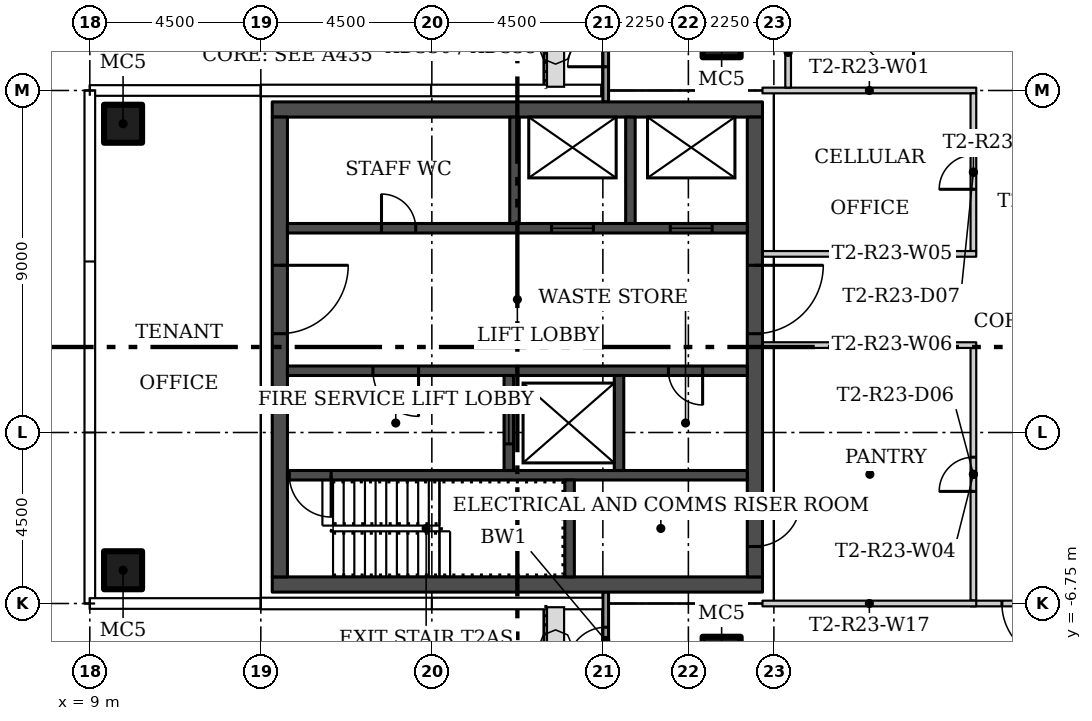
"""IFC4 building model, lengths in metres.
Left out: names, types, materials, properties, quantities, classifications, styles, units other than length and angle.
Written with IfcOpenShell. Run it as: python <this file> out.ifc"""

import sys

from ifc_helpers import new_model, si_unit, direction, frame, frame_2d, origin, origin_2d, place, context, subcontext, project, spatial, rectangle, hollow_rectangle, extrude, element, fill, save


model = new_model("IFC4")
c1 = context("Model", 3, precision=1e-05, world=origin(), true_north=direction((0.0, 1.0)))
c2 = subcontext(c1, "Body", "Model", "MODEL_VIEW")
j1 = project(units=[si_unit("LENGTHUNIT", "METRE"), si_unit("PLANEANGLEUNIT", "RADIAN")], contexts=[c1])
p1 = place(None, origin())
s1 = spatial("IfcSite", under=j1, at=p1, CompositionType="ELEMENT")
p2 = place(p1, origin())
s2 = spatial("IfcBuilding", under=s1, at=p2, CompositionType="ELEMENT")
p3 = place(p2, frame((0.0, 0.0, 210.0)))
s3 = spatial("IfcBuildingStorey", under=s2, at=p3, CompositionType="ELEMENT", Elevation=210.0)
for number, where in (
    (1, (25.625, 8.125, 0.0)),
    (2, (25.625, -8.125, 0.0)),
    (3, (9.875, -5.875, 0.0)),
    (4, (9.875, 5.875, 0.0)),
):
    element("IfcColumn", number, at=place(p3, frame(where)), inside=s3, PredefinedType="COLUMN", context=c2, shape_type="SweptSolid", body=[
        extrude(hollow_rectangle(XDim=1.0, YDim=1.0, WallThickness=0.04, at=origin_2d()), origin(), (0.0, 0.0, 1.0), 3.55),
    ])
p4 = place(p3, frame((32.325, 6.75, 0.0), z_axis=(0.0, 0.0, 1.0), x_axis=(-1.0, 0.0, 0.0)))
e5 = element("IfcWall", 5, at=p4, inside=s3, PredefinedType="PARTITIONING", context=c2, shape_type="SweptSolid", body=[
    extrude(rectangle(XDim=5.625, YDim=0.15, at=frame_2d((2.812, 0.0))), origin(), (0.0, 0.0, 1.0), 3.55),
])
p5 = place(p3, frame((32.25, 2.525, 0.0), z_axis=(0.0, 0.0, 1.0), x_axis=(0.0, 1.0, 0.0)))
e6 = element("IfcWall", 6, at=p5, inside=s3, PredefinedType="PARTITIONING", context=c2, shape_type="SweptSolid", body=[
    extrude(rectangle(XDim=4.15, YDim=0.15, at=frame_2d((2.075, 0.0))), origin(), (0.0, 0.0, 1.0), 3.55),
])
p6 = place(p5, frame((1.625, 0.0, 0.0)))
e7 = element("IfcOpeningElement", 7, at=p6, cuts=e6, PredefinedType="OPENING", context=c2, shape_type="SweptSolid", body=[
    extrude(rectangle(XDim=0.9, YDim=2.1, at=frame_2d((0.45, 1.05))), frame((0.0, 0.085, 0.0), z_axis=(0.0, -1.0, 0.0), x_axis=(1.0, 0.0, 0.0)), (0.0, 0.0, 1.0), 0.17),
])
p7 = place(p3, frame((32.25, -6.675, 0.0), z_axis=(0.0, 0.0, 1.0), x_axis=(0.0, 1.0, 0.0)))
e8 = element("IfcWall", 8, at=p7, inside=s3, PredefinedType="PARTITIONING", context=c2, shape_type="SweptSolid", body=[
    extrude(rectangle(XDim=6.65, YDim=0.15, at=frame_2d((3.325, 0.0))), origin(), (0.0, 0.0, 1.0), 3.55),
])
p8 = place(p7, frame((2.875, 0.0, 0.0)))
e9 = element("IfcOpeningElement", 9, at=p8, cuts=e8, PredefinedType="OPENING", context=c2, shape_type="SweptSolid", body=[
    extrude(rectangle(XDim=0.9, YDim=2.1, at=frame_2d((0.45, 1.05))), frame((0.0, 0.085, 0.0), z_axis=(0.0, -1.0, 0.0), x_axis=(1.0, 0.0, 0.0)), (0.0, 0.0, 1.0), 0.17),
])
p9 = place(p3, frame((26.7, 2.45, 0.0)))
e10 = element("IfcWall", 10, at=p9, inside=s3, PredefinedType="PARTITIONING", context=c2, shape_type="SweptSolid", body=[
    extrude(rectangle(XDim=5.625, YDim=0.15, at=frame_2d((2.812, 0.0))), origin(), (0.0, 0.0, 1.0), 3.55),
])
p10 = place(p3, frame((32.325, 0.05, 0.0), z_axis=(0.0, 0.0, 1.0), x_axis=(-1.0, 0.0, 0.0)))
e11 = element("IfcWall", 11, at=p10, inside=s3, PredefinedType="PARTITIONING", context=c2, shape_type="SweptSolid", body=[
    extrude(rectangle(XDim=5.625, YDim=0.15, at=frame_2d((2.812, 0.0))), origin(), (0.0, 0.0, 1.0), 3.55),
])
p11 = place(p3, frame((27.375, 8.675, 0.0), z_axis=(0.0, 0.0, 1.0), x_axis=(0.0, -1.0, 0.0)))
e12 = element("IfcWall", 12, at=p11, inside=s3, PredefinedType="PARTITIONING", context=c2, shape_type="SweptSolid", body=[
    extrude(rectangle(XDim=1.85, YDim=0.15, at=frame_2d((0.925, 0.0))), origin(), (0.0, 0.0, 1.0), 3.55),
])
p12 = place(p3, frame((35.325, -6.75, 0.0), z_axis=(0.0, 0.0, 1.0), x_axis=(-1.0, 0.0, 0.0)))
e13 = element("IfcWall", 13, at=p12, inside=s3, PredefinedType="PARTITIONING", context=c2, shape_type="SweptSolid", body=[
    extrude(rectangle(XDim=3.15, YDim=0.15, at=frame_2d((1.575, 0.0))), origin(), (0.0, 0.0, 1.0), 3.55),
])
p13 = place(p12, frame((0.825, 0.0, 0.0)))
e14 = element("IfcOpeningElement", 14, at=p13, cuts=e13, PredefinedType="OPENING", context=c2, shape_type="SweptSolid", body=[
    extrude(rectangle(XDim=1.5, YDim=2.1, at=frame_2d((0.75, 1.05))), frame((0.0, 0.085, 0.0), z_axis=(0.0, -1.0, 0.0), x_axis=(1.0, 0.0, 0.0)), (0.0, 0.0, 1.0), 0.17),
])
p14 = place(p3, frame((26.7, -6.75, 0.0)))
e15 = element("IfcWall", 15, at=p14, inside=s3, PredefinedType="PARTITIONING", context=c2, shape_type="SweptSolid", body=[
    extrude(rectangle(XDim=5.625, YDim=0.15, at=frame_2d((2.812, 0.0))), origin(), (0.0, 0.0, 1.0), 3.55),
])
p15 = place(p3, frame((22.575, 6.448, 0.0), z_axis=(0.0, 0.0, 1.0), x_axis=(0.0, 1.0, 0.0)))
e16 = element("IfcWall", 16, at=p15, inside=s3, PredefinedType="SOLIDWALL", context=c2, shape_type="SweptSolid", body=[
    extrude(rectangle(XDim=2.552, YDim=0.15, at=frame_2d((1.276, 0.0))), origin(), (0.0, 0.0, 1.0), 3.45),
])
p16 = place(p15, frame((0.927, 0.0, 0.0)))
e17 = element("IfcOpeningElement", 17, at=p16, cuts=e16, PredefinedType="OPENING", context=c2, shape_type="SweptSolid", body=[
    extrude(rectangle(XDim=1.0, YDim=2.4, at=frame_2d((0.5, 1.2))), frame((0.0, 0.085, 0.0), z_axis=(0.0, -1.0, 0.0), x_axis=(1.0, 0.0, 0.0)), (0.0, 0.0, 1.0), 0.17),
])
p17 = place(p3, frame((22.575, -9.0, 0.0), z_axis=(0.0, 0.0, 1.0), x_axis=(0.0, 1.0, 0.0)))
e18 = element("IfcWall", 18, at=p17, inside=s3, PredefinedType="SOLIDWALL", context=c2, shape_type="SweptSolid", body=[
    extrude(rectangle(XDim=2.557, YDim=0.15, at=frame_2d((1.278, 0.0))), origin(), (0.0, 0.0, 1.0), 3.45),
])
p18 = place(p17, frame((0.625, 0.0, 0.0)))
e19 = element("IfcOpeningElement", 19, at=p18, cuts=e18, PredefinedType="OPENING", context=c2, shape_type="SweptSolid", body=[
    extrude(rectangle(XDim=1.0, YDim=2.4, at=frame_2d((0.5, 1.2))), frame((0.0, 0.085, 0.0), z_axis=(0.0, -1.0, 0.0), x_axis=(1.0, 0.0, 0.0)), (0.0, 0.0, 1.0), 0.17),
])
for number, where in (
    (20, (13.8, -6.25, 0.0)),
    (21, (13.8, 6.25, 0.0)),
):
    element("IfcWall", number, at=place(p3, frame(where)), inside=s3, PredefinedType="SHEAR", context=c2, shape_type="SweptSolid", body=[
        extrude(rectangle(XDim=12.9, YDim=0.4, at=frame_2d((6.45, 0.0))), origin(), (0.0, 0.0, 1.0), 3.55),
    ])
p19 = place(p3, frame((14.0, 6.05, 0.0), z_axis=(0.0, 0.0, 1.0), x_axis=(0.0, -1.0, 0.0)))
e22 = element("IfcWall", 22, at=p19, inside=s3, PredefinedType="SHEAR", context=c2, shape_type="SweptSolid", body=[
    extrude(rectangle(XDim=12.1, YDim=0.4, at=frame_2d((6.05, 0.0))), origin(), (0.0, 0.0, 1.0), 3.55),
])
p20 = place(p19, frame((3.9, 0.0, 0.0)))
e23 = element("IfcOpeningElement", 23, at=p20, cuts=e22, PredefinedType="OPENING", context=c2, shape_type="SweptSolid", body=[
    extrude(rectangle(XDim=1.8, YDim=2.4, at=frame_2d((0.9, 1.2))), frame((0.0, 0.21, 0.0), z_axis=(0.0, -1.0, 0.0), x_axis=(1.0, 0.0, 0.0)), (0.0, 0.0, 1.0), 0.42),
])
p21 = place(p3, frame((26.5, 6.05, 0.0), z_axis=(0.0, 0.0, 1.0), x_axis=(0.0, -1.0, 0.0)))
e24 = element("IfcWall", 24, at=p21, inside=s3, PredefinedType="SHEAR", context=c2, shape_type="SweptSolid", body=[
    extrude(rectangle(XDim=12.1, YDim=0.4, at=frame_2d((6.05, 0.0))), origin(), (0.0, 0.0, 1.0), 3.55),
])
p22 = place(p21, frame((10.1, 0.0, 0.0)))
e25 = element("IfcOpeningElement", 25, at=p22, cuts=e24, PredefinedType="OPENING", context=c2, shape_type="SweptSolid", body=[
    extrude(rectangle(XDim=1.2, YDim=2.1, at=frame_2d((0.6, 1.05))), frame((0.0, 0.21, 0.0), z_axis=(0.0, -1.0, 0.0), x_axis=(1.0, 0.0, 0.0)), (0.0, 0.0, 1.0), 0.42),
])
p23 = place(p21, frame((3.9, 0.0, 0.0)))
e26 = element("IfcOpeningElement", 26, at=p23, cuts=e24, PredefinedType="OPENING", context=c2, shape_type="SweptSolid", body=[
    extrude(rectangle(XDim=1.8, YDim=2.4, at=frame_2d((0.9, 1.2))), frame((0.0, 0.21, 0.0), z_axis=(0.0, -1.0, 0.0), x_axis=(1.0, 0.0, 0.0)), (0.0, 0.0, 1.0), 0.42),
])
p24 = place(p3, frame((26.3, -3.375, 0.0), z_axis=(0.0, 0.0, 1.0), x_axis=(-1.0, 0.0, 0.0)))
e27 = element("IfcWall", 27, at=p24, inside=s3, PredefinedType="SHEAR", context=c2, shape_type="SweptSolid", body=[
    extrude(rectangle(XDim=12.1, YDim=0.25, at=frame_2d((6.05, 0.0))), origin(), (0.0, 0.0, 1.0), 3.55),
])
p25 = place(p24, frame((10.95, 0.0, 0.0)))
e28 = element("IfcOpeningElement", 28, at=p25, cuts=e27, PredefinedType="OPENING", context=c2, shape_type="SweptSolid", body=[
    extrude(rectangle(XDim=1.1, YDim=2.1, at=frame_2d((0.55, 1.05))), frame((0.0, 0.135, 0.0), z_axis=(0.0, -1.0, 0.0), x_axis=(1.0, 0.0, 0.0)), (0.0, 0.0, 1.0), 0.27),
])
p26 = place(p3, frame((21.625, -6.05, 0.0), z_axis=(0.0, 0.0, 1.0), x_axis=(0.0, 1.0, 0.0)))
e29 = element("IfcWall", 29, at=p26, inside=s3, PredefinedType="SHEAR", context=c2, shape_type="SweptSolid", body=[
    extrude(rectangle(XDim=2.55, YDim=0.25, at=frame_2d((1.275, 0.0))), origin(), (0.0, 0.0, 1.0), 3.55),
])
p27 = place(p3, frame((26.3, -0.625, 0.0), z_axis=(0.0, 0.0, 1.0), x_axis=(-1.0, 0.0, 0.0)))
e30 = element("IfcWall", 30, at=p27, inside=s3, PredefinedType="SHEAR", context=c2, shape_type="SweptSolid", body=[
    extrude(rectangle(XDim=12.1, YDim=0.25, at=frame_2d((6.05, 0.0))), origin(), (0.0, 0.0, 1.0), 3.55),
])
p28 = place(p27, frame((8.65, 0.0, 0.0)))
e31 = element("IfcOpeningElement", 31, at=p28, cuts=e30, PredefinedType="OPENING", context=c2, shape_type="SweptSolid", body=[
    extrude(rectangle(XDim=1.2, YDim=2.1, at=frame_2d((0.6, 1.05))), frame((0.0, 0.135, 0.0), z_axis=(0.0, -1.0, 0.0), x_axis=(1.0, 0.0, 0.0)), (0.0, 0.0, 1.0), 0.27),
])
p29 = place(p27, frame((1.175, 0.0, 0.0)))
e32 = element("IfcOpeningElement", 32, at=p29, cuts=e30, PredefinedType="OPENING", context=c2, shape_type="SweptSolid", body=[
    extrude(rectangle(XDim=0.9, YDim=2.1, at=frame_2d((0.45, 1.05))), frame((0.0, 0.135, 0.0), z_axis=(0.0, -1.0, 0.0), x_axis=(1.0, 0.0, 0.0)), (0.0, 0.0, 1.0), 0.27),
])
p30 = place(p3, frame((20.025, -3.25, 0.0), z_axis=(0.0, 0.0, 1.0), x_axis=(0.0, 1.0, 0.0)))
e33 = element("IfcWall", 33, at=p30, inside=s3, PredefinedType="SHEAR", context=c2, shape_type="SweptSolid", body=[
    extrude(rectangle(XDim=2.5, YDim=0.25, at=frame_2d((1.25, 0.0))), origin(), (0.0, 0.0, 1.0), 3.55),
])
p31 = place(p30, frame((0.7, 0.0, 0.0)))
e34 = element("IfcOpeningElement", 34, at=p31, cuts=e33, PredefinedType="OPENING", context=c2, shape_type="SweptSolid", body=[
    extrude(rectangle(XDim=1.1, YDim=2.1, at=frame_2d((0.55, 1.05))), frame((0.0, 0.135, 0.0), z_axis=(0.0, -1.0, 0.0), x_axis=(1.0, 0.0, 0.0)), (0.0, 0.0, 1.0), 0.27),
])
p32 = place(p3, frame((22.925, -3.25, 0.0), z_axis=(0.0, 0.0, 1.0), x_axis=(0.0, 1.0, 0.0)))
e35 = element("IfcWall", 35, at=p32, inside=s3, PredefinedType="SHEAR", context=c2, shape_type="SweptSolid", body=[
    extrude(rectangle(XDim=2.5, YDim=0.25, at=frame_2d((1.25, 0.0))), origin(), (0.0, 0.0, 1.0), 3.55),
])
p33 = place(p3, frame((14.2, 3.125, 0.0)))
e36 = element("IfcWall", 36, at=p33, inside=s3, PredefinedType="SHEAR", context=c2, shape_type="SweptSolid", body=[
    extrude(rectangle(XDim=12.1, YDim=0.25, at=frame_2d((6.05, 0.0))), origin(), (0.0, 0.0, 1.0), 3.55),
])
p34 = place(p33, frame((6.95, 0.0, 0.0)))
e37 = element("IfcOpeningElement", 37, at=p34, cuts=e36, PredefinedType="OPENING", context=c2, shape_type="SweptSolid", body=[
    extrude(rectangle(XDim=1.1, YDim=2.1, at=frame_2d((0.55, 1.05))), frame((0.0, 0.135, 0.0), z_axis=(0.0, -1.0, 0.0), x_axis=(1.0, 0.0, 0.0)), (0.0, 0.0, 1.0), 0.27),
])
p35 = place(p33, frame((10.075, 0.0, 0.0)))
e38 = element("IfcOpeningElement", 38, at=p35, cuts=e36, PredefinedType="OPENING", context=c2, shape_type="SweptSolid", body=[
    extrude(rectangle(XDim=1.1, YDim=2.1, at=frame_2d((0.55, 1.05))), frame((0.0, 0.135, 0.0), z_axis=(0.0, -1.0, 0.0), x_axis=(1.0, 0.0, 0.0)), (0.0, 0.0, 1.0), 0.27),
])
p36 = place(p33, frame((2.475, 0.0, 0.0)))
e39 = element("IfcOpeningElement", 39, at=p36, cuts=e36, PredefinedType="OPENING", context=c2, shape_type="SweptSolid", body=[
    extrude(rectangle(XDim=0.9, YDim=2.1, at=frame_2d((0.45, 1.05))), frame((0.0, 0.135, 0.0), z_axis=(0.0, -1.0, 0.0), x_axis=(1.0, 0.0, 0.0)), (0.0, 0.0, 1.0), 0.27),
])
for number, where, z_axis, x_axis in (
    (40, (20.175, 3.25, 0.0), (0.0, 0.0, 1.0), (0.0, 1.0, 0.0)),
    (41, (23.225, 3.25, 0.0), (0.0, 0.0, 1.0), (0.0, 1.0, 0.0)),
):
    element("IfcWall", number, at=place(p3, frame(where, z_axis=z_axis, x_axis=x_axis)), inside=s3, PredefinedType="SHEAR", context=c2, shape_type="SweptSolid", body=[
        extrude(rectangle(XDim=2.8, YDim=0.25, at=frame_2d((1.4, 0.0))), origin(), (0.0, 0.0, 1.0), 3.55),
    ])
p37 = place(p13, origin())
e42 = element("IfcDoor", 42, at=p37, inside=s3, OperationType="DOUBLE_DOOR_SINGLE_SWING", PredefinedType="DOOR", context=c2, shape_type="SweptSolid", body=[
    extrude(rectangle(XDim=1.5, YDim=2.1, at=frame_2d((0.75, 1.05))), frame((0.0, 0.025, 0.0), z_axis=(0.0, -1.0, 0.0), x_axis=(1.0, 0.0, 0.0)), (0.0, 0.0, 1.0), 0.05),
])
fill(e14, e42)
p38 = place(p8, origin())
e43 = element("IfcDoor", 43, at=p38, inside=s3, OperationType="SINGLE_SWING_LEFT", PredefinedType="DOOR", context=c2, shape_type="SweptSolid", body=[
    extrude(rectangle(XDim=0.9, YDim=2.1, at=frame_2d((0.45, 1.05))), frame((0.0, 0.025, 0.0), z_axis=(0.0, -1.0, 0.0), x_axis=(1.0, 0.0, 0.0)), (0.0, 0.0, 1.0), 0.05),
])
fill(e9, e43)
p39 = place(p6, origin())
e44 = element("IfcDoor", 44, at=p39, inside=s3, OperationType="SINGLE_SWING_LEFT", PredefinedType="DOOR", context=c2, shape_type="SweptSolid", body=[
    extrude(rectangle(XDim=0.9, YDim=2.1, at=frame_2d((0.45, 1.05))), frame((0.0, 0.025, 0.0), z_axis=(0.0, -1.0, 0.0), x_axis=(1.0, 0.0, 0.0)), (0.0, 0.0, 1.0), 0.05),
])
fill(e7, e44)
p40 = place(p16, origin())
e45 = element("IfcDoor", 45, at=p40, inside=s3, OperationType="SINGLE_SWING_LEFT", PredefinedType="DOOR", context=c2, shape_type="SweptSolid", body=[
    extrude(rectangle(XDim=1.0, YDim=2.4, at=frame_2d((0.5, 1.2))), frame((0.0, 0.025, 0.0), z_axis=(0.0, -1.0, 0.0), x_axis=(1.0, 0.0, 0.0)), (0.0, 0.0, 1.0), 0.05),
])
fill(e17, e45)
p41 = place(p18, origin())
e46 = element("IfcDoor", 46, at=p41, inside=s3, OperationType="SINGLE_SWING_LEFT", PredefinedType="DOOR", context=c2, shape_type="SweptSolid", body=[
    extrude(rectangle(XDim=1.0, YDim=2.4, at=frame_2d((0.5, 1.2))), frame((0.0, 0.025, 0.0), z_axis=(0.0, -1.0, 0.0), x_axis=(1.0, 0.0, 0.0)), (0.0, 0.0, 1.0), 0.05),
])
fill(e19, e46)
p42 = place(p20, origin())
e47 = element("IfcDoor", 47, at=p42, inside=s3, OperationType="DOUBLE_DOOR_SINGLE_SWING", PredefinedType="DOOR", context=c2, shape_type="SweptSolid", body=[
    extrude(rectangle(XDim=1.8, YDim=2.4, at=frame_2d((0.9, 1.2))), frame((0.0, 0.025, 0.0), z_axis=(0.0, -1.0, 0.0), x_axis=(1.0, 0.0, 0.0)), (0.0, 0.0, 1.0), 0.05),
])
fill(e23, e47)
p43 = place(p22, origin())
e48 = element("IfcDoor", 48, at=p43, inside=s3, OperationType="SINGLE_SWING_RIGHT", PredefinedType="DOOR", context=c2, shape_type="SweptSolid", body=[
    extrude(rectangle(XDim=1.2, YDim=2.1, at=frame_2d((0.6, 1.05))), frame((0.0, 0.025, 0.0), z_axis=(0.0, -1.0, 0.0), x_axis=(1.0, 0.0, 0.0)), (0.0, 0.0, 1.0), 0.05),
])
fill(e25, e48)
p44 = place(p23, origin())
e49 = element("IfcDoor", 49, at=p44, inside=s3, OperationType="DOUBLE_DOOR_SINGLE_SWING", PredefinedType="DOOR", context=c2, shape_type="SweptSolid", body=[
    extrude(rectangle(XDim=1.8, YDim=2.4, at=frame_2d((0.9, 1.2))), frame((0.0, 0.025, 0.0), z_axis=(0.0, -1.0, 0.0), x_axis=(1.0, 0.0, 0.0)), (0.0, 0.0, 1.0), 0.05),
])
fill(e26, e49)
p45 = place(p25, origin())
e50 = element("IfcDoor", 50, at=p45, inside=s3, OperationType="SINGLE_SWING_RIGHT", PredefinedType="DOOR", context=c2, shape_type="SweptSolid", body=[
    extrude(rectangle(XDim=1.1, YDim=2.1, at=frame_2d((0.55, 1.05))), frame((0.0, 0.025, 0.0), z_axis=(0.0, -1.0, 0.0), x_axis=(1.0, 0.0, 0.0)), (0.0, 0.0, 1.0), 0.05),
])
fill(e28, e50)
p46 = place(p28, origin())
e51 = element("IfcDoor", 51, at=p46, inside=s3, OperationType="SINGLE_SWING_RIGHT", PredefinedType="DOOR", context=c2, shape_type="SweptSolid", body=[
    extrude(rectangle(XDim=1.2, YDim=2.1, at=frame_2d((0.6, 1.05))), frame((0.0, 0.025, 0.0), z_axis=(0.0, -1.0, 0.0), x_axis=(1.0, 0.0, 0.0)), (0.0, 0.0, 1.0), 0.05),
])
fill(e31, e51)
p47 = place(p29, origin())
e52 = element("IfcDoor", 52, at=p47, inside=s3, OperationType="SINGLE_SWING_LEFT", PredefinedType="DOOR", context=c2, shape_type="SweptSolid", body=[
    extrude(rectangle(XDim=0.9, YDim=2.1, at=frame_2d((0.45, 1.05))), frame((0.0, 0.025, 0.0), z_axis=(0.0, -1.0, 0.0), x_axis=(1.0, 0.0, 0.0)), (0.0, 0.0, 1.0), 0.05),
])
fill(e32, e52)
p48 = place(p31, origin())
e53 = element("IfcDoor", 53, at=p48, inside=s3, OperationType="SLIDING_TO_LEFT", PredefinedType="DOOR", context=c2, shape_type="SweptSolid", body=[
    extrude(rectangle(XDim=1.1, YDim=2.1, at=frame_2d((0.55, 1.05))), frame((0.0, 0.025, 0.0), z_axis=(0.0, -1.0, 0.0), x_axis=(1.0, 0.0, 0.0)), (0.0, 0.0, 1.0), 0.05),
])
fill(e34, e53)
p49 = place(p34, origin())
e54 = element("IfcDoor", 54, at=p49, inside=s3, OperationType="SLIDING_TO_LEFT", PredefinedType="DOOR", context=c2, shape_type="SweptSolid", body=[
    extrude(rectangle(XDim=1.1, YDim=2.1, at=frame_2d((0.55, 1.05))), frame((0.0, 0.025, 0.0), z_axis=(0.0, -1.0, 0.0), x_axis=(1.0, 0.0, 0.0)), (0.0, 0.0, 1.0), 0.05),
])
fill(e37, e54)
p50 = place(p35, origin())
e55 = element("IfcDoor", 55, at=p50, inside=s3, OperationType="SLIDING_TO_LEFT", PredefinedType="DOOR", context=c2, shape_type="SweptSolid", body=[
    extrude(rectangle(XDim=1.1, YDim=2.1, at=frame_2d((0.55, 1.05))), frame((0.0, 0.025, 0.0), z_axis=(0.0, -1.0, 0.0), x_axis=(1.0, 0.0, 0.0)), (0.0, 0.0, 1.0), 0.05),
])
fill(e38, e55)
p51 = place(p36, origin())
e56 = element("IfcDoor", 56, at=p51, inside=s3, OperationType="SINGLE_SWING_LEFT", PredefinedType="DOOR", context=c2, shape_type="SweptSolid", body=[
    extrude(rectangle(XDim=0.9, YDim=2.1, at=frame_2d((0.45, 1.05))), frame((0.0, 0.025, 0.0), z_axis=(0.0, -1.0, 0.0), x_axis=(1.0, 0.0, 0.0)), (0.0, 0.0, 1.0), 0.05),
])
fill(e39, e56)
save(model, sys.argv[1])
